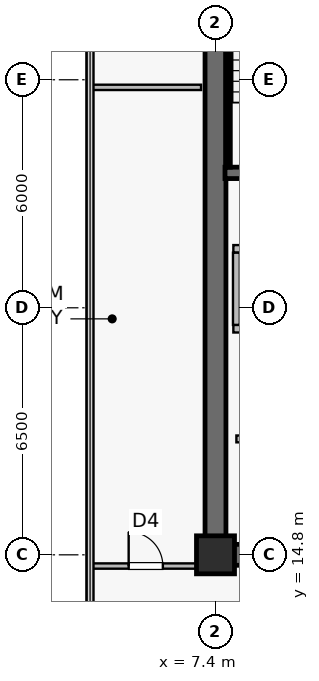
"""IFC4 building model, lengths in metres.
Left out: names, types, materials, properties, quantities, classifications, styles, units other than length and angle.
Written with IfcOpenShell. Run it as: python <this file> out.ifc"""

import sys

from ifc_helpers import new_model, si_unit, direction, frame, frame_2d, origin, origin_2d, place, context, subcontext, project, spatial, rectangle, extrude, source, transform, mapped, element, fill, save


model = new_model("IFC4")
c1 = context("Model", 3, precision=1e-05, world=origin(), true_north=direction((0.0, 1.0)))
c2 = subcontext(c1, "Body", "Model", "MODEL_VIEW")
j1 = project(units=[si_unit("LENGTHUNIT", "METRE"), si_unit("PLANEANGLEUNIT", "RADIAN")], contexts=[c1])
p1 = place(None, origin())
s1 = spatial("IfcSite", under=j1, at=p1, CompositionType="ELEMENT")
p2 = place(p1, origin())
s2 = spatial("IfcBuilding", under=s1, at=p2, CompositionType="ELEMENT")
p3 = place(p2, frame((0.0, 0.0, 226.0)))
s3 = spatial("IfcBuildingStorey", under=s2, at=p3, CompositionType="ELEMENT", Elevation=226.0)
p4 = place(p3, frame((7.125, 14.8, 0.0), z_axis=(0.0, 0.0, 1.0), x_axis=(1.0, 0.0, 0.0)))
e1 = element("IfcWall", 1, at=p4, inside=s3, PredefinedType="SHEAR", context=c2, shape_type="SweptSolid", body=[
    extrude(rectangle(XDim=15.35, YDim=0.55, at=frame_2d((7.675, 0.0))), origin(), (0.0, 0.0, 1.0), 3.8),
])
p5 = place(p3, frame((7.4, 15.075, 0.0), z_axis=(0.0, 0.0, 1.0), x_axis=(0.0, 1.0, 0.0)))
e2 = element("IfcWall", 2, at=p5, inside=s3, PredefinedType="SHEAR", context=c2, shape_type="SweptSolid", body=[
    extrude(rectangle(XDim=18.45, YDim=0.55, at=frame_2d((9.225, 0.0))), origin(), (0.0, 0.0, 1.0), 3.8),
])
p6 = place(p3, frame((7.65, 24.85, 0.0), z_axis=(0.0, 0.0, 1.0), x_axis=(1.0, 0.0, 0.0)))
e3 = element("IfcWall", 3, at=p6, inside=s3, PredefinedType="SHEAR", context=c2, shape_type="SweptSolid", body=[
    extrude(rectangle(XDim=3.8, YDim=0.3, at=frame_2d((1.9, 0.0))), origin(), (0.0, 0.0, 1.0), 3.8),
])
p7 = place(p3, frame((7.73, 25.0, 0.0), z_axis=(0.0, 0.0, 1.0), x_axis=(0.0, 1.0, 0.0)))
e4 = element("IfcWall", 4, at=p7, inside=s3, PredefinedType="SOLIDWALL", context=c2, shape_type="SweptSolid", body=[
    extrude(rectangle(XDim=8.32, YDim=0.12, at=frame_2d((4.16, 0.0))), origin(), (0.0, 0.0, 1.0), 3.8),
])
m1 = source(origin(), c2, "Body", "SweptSolid", [
    extrude(rectangle(XDim=1.0, YDim=1.0, at=origin_2d()), origin(), (0.0, 0.0, 1.0), 4.1),
])
p8 = place(p3, frame((7.4, 14.8, 0.0), z_axis=(0.0, 0.0, 1.0), x_axis=(1.0, 0.0, 0.0)))
e5 = element("IfcColumn", 5, at=p8, inside=s3, PredefinedType="COLUMN", context=c2, shape_type="MappedRepresentation", body=[
    mapped(m1, transform((0.0, 0.0, 0.0), scale=1.0)),
])
p9 = place(p3, frame((7.87, 20.75, 0.0), z_axis=(0.0, 0.0, 1.0), x_axis=(1.0, 0.0, 0.0)))
e6 = element("IfcWall", 6, at=p9, inside=s3, PredefinedType="SOLIDWALL", context=c2, shape_type="SweptSolid", body=[
    extrude(rectangle(XDim=2.26, YDim=0.2, at=frame_2d((1.13, 0.0))), origin(), (0.0, 0.0, 1.0), 3.8),
])
p10 = place(p9, frame((0.58, 0.0, 0.0)))
e7 = element("IfcOpeningElement", 7, at=p10, cuts=e6, PredefinedType="OPENING", context=c2, shape_type="SweptSolid", body=[
    extrude(rectangle(XDim=1.1, YDim=2.22, at=frame_2d((0.55, 1.11))), frame((0.0, 0.11, 0.0), z_axis=(0.0, -1.0, 0.0), x_axis=(1.0, 0.0, 0.0)), (0.0, 0.0, 1.0), 0.22),
])
p11 = place(p3, frame((7.87, 22.85, 0.0), z_axis=(0.0, 0.0, 1.0), x_axis=(1.0, 0.0, 0.0)))
e8 = element("IfcWall", 8, at=p11, inside=s3, PredefinedType="SOLIDWALL", context=c2, shape_type="SweptSolid", body=[
    extrude(rectangle(XDim=2.26, YDim=0.2, at=frame_2d((1.13, 0.0))), origin(), (0.0, 0.0, 1.0), 3.8),
])
p12 = place(p3, frame((7.95, 20.85, 0.0), z_axis=(0.0, 0.0, 1.0), x_axis=(0.0, 1.0, 0.0)))
e9 = element("IfcWall", 9, at=p12, inside=s3, PredefinedType="SOLIDWALL", context=c2, shape_type="SweptSolid", body=[
    extrude(rectangle(XDim=1.9, YDim=0.18, at=frame_2d((0.95, 0.0))), origin(), (0.0, 0.0, 1.0), 3.8),
])
p13 = place(p3, frame((7.95, 17.85, 0.0), z_axis=(0.0, 0.0, 1.0), x_axis=(1.0, 0.0, 0.0)))
e10 = element("IfcWall", 10, at=p13, inside=s3, PredefinedType="SOLIDWALL", context=c2, shape_type="SweptSolid", body=[
    extrude(rectangle(XDim=3.25, YDim=0.18, at=frame_2d((1.625, 0.0))), origin(), (0.0, 0.0, 1.0), 3.8),
])
p14 = place(p13, frame((1.15, 0.0, 0.0)))
e11 = element("IfcOpeningElement", 11, at=p14, cuts=e10, PredefinedType="OPENING", context=c2, shape_type="SweptSolid", body=[
    extrude(rectangle(XDim=0.95, YDim=2.15, at=frame_2d((0.475, 1.075))), frame((0.0, 0.1, 0.0), z_axis=(0.0, -1.0, 0.0), x_axis=(1.0, 0.0, 0.0)), (0.0, 0.0, 1.0), 0.2),
])
p15 = place(p3, frame((4.11, 27.1, 0.0), z_axis=(0.0, 0.0, 1.0), x_axis=(1.0, 0.0, 0.0)))
e12 = element("IfcWall", 12, at=p15, inside=s3, PredefinedType="PARTITIONING", context=c2, shape_type="SweptSolid", body=[
    extrude(rectangle(XDim=2.91, YDim=0.14, at=frame_2d((1.455, 0.0))), origin(), (0.0, 0.0, 1.0), 3.8),
])
p16 = place(p3, frame((4.11, 14.505, 0.0), z_axis=(0.0, 0.0, 1.0), x_axis=(1.0, 0.0, 0.0)))
e13 = element("IfcWall", 13, at=p16, inside=s3, PredefinedType="PARTITIONING", context=c2, shape_type="SweptSolid", body=[
    extrude(rectangle(XDim=2.91, YDim=0.14, at=frame_2d((1.455, 0.0))), origin(), (0.0, 0.0, 1.0), 3.8),
])
p17 = place(p16, frame((1.005, 0.0, 0.0)))
e14 = element("IfcOpeningElement", 14, at=p17, cuts=e13, PredefinedType="OPENING", context=c2, shape_type="SweptSolid", body=[
    extrude(rectangle(XDim=0.9, YDim=2.1, at=frame_2d((0.45, 1.05))), frame((0.0, 0.08, 0.0), z_axis=(0.0, -1.0, 0.0), x_axis=(1.0, 0.0, 0.0)), (0.0, 0.0, 1.0), 0.16),
])
m2 = source(origin(), c2, "Body", "SweptSolid", [
    extrude(rectangle(XDim=0.9, YDim=2.1, at=frame_2d((0.45, 1.05))), frame((0.0, 0.025, 0.0), z_axis=(0.0, -1.0, 0.0), x_axis=(1.0, 0.0, 0.0)), (0.0, 0.0, 1.0), 0.05),
])
p18 = place(p17, origin())
e15 = element("IfcDoor", 15, at=p18, inside=s3, OperationType="SINGLE_SWING_LEFT", PredefinedType="DOOR", context=c2, shape_type="MappedRepresentation", body=[
    mapped(m2, transform((0.0, 0.0, 0.0), scale=1.0)),
])
fill(e14, e15)
save(model, sys.argv[1])
